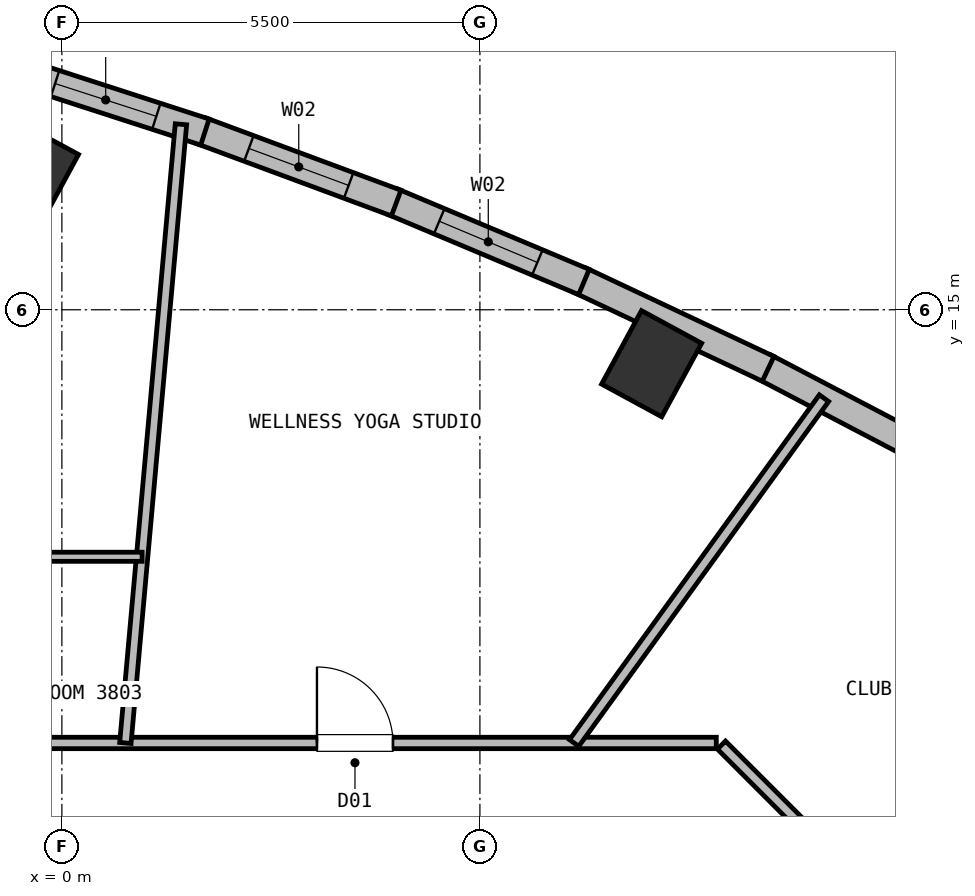
"""IFC4 building model, lengths in metres.
Left out: names, types, materials, properties, quantities, classifications, styles, units other than length and angle.
Written with IfcOpenShell. Run it as: python <this file> out.ifc"""

import sys

from ifc_helpers import new_model, si_unit, direction, frame, frame_2d, origin, origin_2d, place, context, subcontext, project, spatial, rectangle, extrude, element, fill, save


model = new_model("IFC4")
c1 = context("Model", 3, precision=1e-05, world=origin(), true_north=direction((0.0, 1.0)))
c2 = subcontext(c1, "Body", "Model", "MODEL_VIEW")
j1 = project(units=[si_unit("LENGTHUNIT", "METRE"), si_unit("PLANEANGLEUNIT", "RADIAN")], contexts=[c1])
p1 = place(None, origin())
s1 = spatial("IfcSite", under=j1, at=p1, CompositionType="ELEMENT")
p2 = place(p1, origin())
s2 = spatial("IfcBuilding", under=s1, at=p2, CompositionType="ELEMENT")
p3 = place(p2, frame((0.0, 0.0, 142.25)))
s3 = spatial("IfcBuildingStorey", under=s2, at=p3, CompositionType="ELEMENT", Elevation=142.25)
for number, where, z_axis, x_axis in (
    (1, (7.759, 14.29, 0.0), (0.0, 0.0, 1.0), (-0.879, 0.477, 0.0)),
    (2, (-0.439, 16.774, 0.0), (0.0, 0.0, 1.0), (-0.879, 0.477, 0.0)),
):
    element("IfcColumn", number, at=place(p3, frame(where, z_axis=z_axis, x_axis=x_axis)), inside=s3, PredefinedType="COLUMN", context=c2, shape_type="SweptSolid", body=[
        extrude(rectangle(XDim=0.9, YDim=1.1, at=origin_2d()), origin(), (0.0, 0.0, 1.0), 3.75),
    ])
p4 = place(p3, frame((9.248, 14.245, 0.0), z_axis=(0.0, 0.0, 1.0), x_axis=(0.885821049336, -0.464027012741, 0.0)))
e3 = element("IfcWall", 3, at=p4, inside=s3, PredefinedType="SOLIDWALL", context=c2, shape_type="SweptSolid", body=[
    extrude(rectangle(XDim=2.734, YDim=0.36, at=frame_2d((1.367, 0.0))), origin(), (0.0, 0.0, 1.0), 3.5),
])
p5 = place(p3, frame((6.823, 15.386, 0.0), z_axis=(0.0, 0.0, 1.0), x_axis=(0.904715296729, -0.426016703739, 0.0)))
e4 = element("IfcWall", 4, at=p5, inside=s3, PredefinedType="SOLIDWALL", context=c2, shape_type="SweptSolid", body=[
    extrude(rectangle(XDim=2.729, YDim=0.36, at=frame_2d((1.365, 0.0))), origin(), (0.0, 0.0, 1.0), 3.5),
])
p6 = place(p3, frame((4.352, 16.422, 0.0), z_axis=(0.0, 0.0, 1.0), x_axis=(0.921993601294, -0.387205112534, 0.0)))
e5 = element("IfcWall", 5, at=p6, inside=s3, PredefinedType="SOLIDWALL", context=c2, shape_type="SweptSolid", body=[
    extrude(rectangle(XDim=2.729, YDim=0.36, at=frame_2d((1.365, 0.0))), origin(), (0.0, 0.0, 1.0), 3.5),
])
p7 = place(p6, frame((0.665, 0.0, 0.72)))
e6 = element("IfcOpeningElement", 6, at=p7, cuts=e5, PredefinedType="OPENING", context=c2, shape_type="SweptSolid", body=[
    extrude(rectangle(XDim=1.4, YDim=1.84, at=frame_2d((0.7, 0.92))), frame((0.0, 0.19, 0.0), z_axis=(0.0, -1.0, 0.0), x_axis=(1.0, 0.0, 0.0)), (0.0, 0.0, 1.0), 0.38),
])
p8 = place(p3, frame((1.835, 17.355, 0.0), z_axis=(0.0, 0.0, 1.0), x_axis=(0.937570914704, -0.347794163121, 0.0)))
e7 = element("IfcWall", 7, at=p8, inside=s3, PredefinedType="SOLIDWALL", context=c2, shape_type="SweptSolid", body=[
    extrude(rectangle(XDim=2.734, YDim=0.36, at=frame_2d((1.367, 0.0))), origin(), (0.0, 0.0, 1.0), 3.5),
])
p9 = place(p8, frame((0.667, 0.0, 0.72)))
e8 = element("IfcOpeningElement", 8, at=p9, cuts=e7, PredefinedType="OPENING", context=c2, shape_type="SweptSolid", body=[
    extrude(rectangle(XDim=1.4, YDim=1.84, at=frame_2d((0.7, 0.92))), frame((0.0, 0.19, 0.0), z_axis=(0.0, -1.0, 0.0), x_axis=(1.0, 0.0, 0.0)), (0.0, 0.0, 1.0), 0.38),
])
p10 = place(p3, frame((-0.729, 18.184, 0.0), z_axis=(0.0, 0.0, 1.0), x_axis=(0.951405423372, -0.307941098877, 0.0)))
e9 = element("IfcWall", 9, at=p10, inside=s3, PredefinedType="SOLIDWALL", context=c2, shape_type="SweptSolid", body=[
    extrude(rectangle(XDim=2.744, YDim=0.36, at=frame_2d((1.372, 0.0))), origin(), (0.0, 0.0, 1.0), 3.5),
])
p11 = place(p10, frame((0.672, 0.0, 0.72)))
e10 = element("IfcOpeningElement", 10, at=p11, cuts=e9, PredefinedType="OPENING", context=c2, shape_type="SweptSolid", body=[
    extrude(rectangle(XDim=1.4, YDim=1.84, at=frame_2d((0.7, 0.92))), frame((0.0, 0.19, 0.0), z_axis=(0.0, -1.0, 0.0), x_axis=(1.0, 0.0, 0.0)), (0.0, 0.0, 1.0), 0.38),
])
p12 = place(p3, frame((8.678, 9.272, 0.0), z_axis=(0.0, 0.0, 1.0), x_axis=(0.707106781187, -0.707106781187, 0.0)))
e11 = element("IfcWall", 11, at=p12, inside=s3, PredefinedType="PARTITIONING", context=c2, shape_type="SweptSolid", body=[
    extrude(rectangle(XDim=2.89, YDim=0.15, at=frame_2d((1.445, 0.0))), origin(), (0.0, 0.0, 1.0), 3.5),
])
p13 = place(p3, frame((-8.61, 9.3, 0.0), z_axis=(0.0, 0.0, 1.0), x_axis=(1.0, 0.0, 0.0)))
e12 = element("IfcWall", 12, at=p13, inside=s3, PredefinedType="PARTITIONING", context=c2, shape_type="SweptSolid", body=[
    extrude(rectangle(XDim=17.22, YDim=0.15, at=frame_2d((8.61, 0.0))), origin(), (0.0, 0.0, 1.0), 3.5),
])
p14 = place(p13, frame((11.966, 0.0, 0.0)))
e13 = element("IfcOpeningElement", 13, at=p14, cuts=e12, PredefinedType="OPENING", context=c2, shape_type="SweptSolid", body=[
    extrude(rectangle(XDim=1.0, YDim=2.15, at=frame_2d((0.5, 1.075))), frame((0.0, 0.085, 0.0), z_axis=(0.0, -1.0, 0.0), x_axis=(1.0, 0.0, 0.0)), (0.0, 0.0, 1.0), 0.17),
])
p15 = place(p13, frame((1.059, 0.0, 0.0)))
e14 = element("IfcOpeningElement", 14, at=p15, cuts=e12, PredefinedType="OPENING", context=c2, shape_type="SweptSolid", body=[
    extrude(rectangle(XDim=1.0, YDim=2.15, at=frame_2d((0.5, 1.075))), frame((0.0, 0.085, 0.0), z_axis=(0.0, -1.0, 0.0), x_axis=(1.0, 0.0, 0.0)), (0.0, 0.0, 1.0), 0.17),
])
p16 = place(p13, frame((4.252, 0.0, 0.0)))
e15 = element("IfcOpeningElement", 15, at=p16, cuts=e12, PredefinedType="OPENING", context=c2, shape_type="SweptSolid", body=[
    extrude(rectangle(XDim=1.06, YDim=2.15, at=frame_2d((0.53, 1.075))), frame((0.0, 0.085, 0.0), z_axis=(0.0, -1.0, 0.0), x_axis=(1.0, 0.0, 0.0)), (0.0, 0.0, 1.0), 0.17),
])
p17 = place(p3, frame((6.739, 9.3, 0.0), z_axis=(0.0, 0.0, 1.0), x_axis=(0.586776904719, 0.809748642536, 0.0)))
e16 = element("IfcWall", 16, at=p17, inside=s3, PredefinedType="PARTITIONING", context=c2, shape_type="SweptSolid", body=[
    extrude(rectangle(XDim=5.603, YDim=0.15, at=frame_2d((2.801, 0.0))), origin(), (0.0, 0.0, 1.0), 3.5),
])
p18 = place(p3, frame((0.835, 9.3, 0.0), z_axis=(0.0, 0.0, 1.0), x_axis=(0.089461102412, 0.995990316798, 0.0)))
e17 = element("IfcWall", 17, at=p18, inside=s3, PredefinedType="PARTITIONING", context=c2, shape_type="SweptSolid", body=[
    extrude(rectangle(XDim=8.173, YDim=0.15, at=frame_2d((4.087, 0.0))), origin(), (0.0, 0.0, 1.0), 3.5),
])
p19 = place(p3, frame((-2.469, 11.75, 0.0), z_axis=(0.0, 0.0, 1.0), x_axis=(1.0, 0.0, 0.0)))
e18 = element("IfcWall", 18, at=p19, inside=s3, PredefinedType="PARTITIONING", context=c2, shape_type="SweptSolid", body=[
    extrude(rectangle(XDim=3.524, YDim=0.12, at=frame_2d((1.762, 0.0))), origin(), (0.0, 0.0, 1.0), 3.5),
])
p20 = place(p19, frame((1.302, 0.0, 0.0)))
e19 = element("IfcOpeningElement", 19, at=p20, cuts=e18, PredefinedType="OPENING", context=c2, shape_type="SweptSolid", body=[
    extrude(rectangle(XDim=0.92, YDim=2.1, at=frame_2d((0.46, 1.05))), frame((0.0, 0.07, 0.0), z_axis=(0.0, -1.0, 0.0), x_axis=(1.0, 0.0, 0.0)), (0.0, 0.0, 1.0), 0.14),
])
p21 = place(p7, origin())
e20 = element("IfcWindow", 20, at=p21, inside=s3, PartitioningType="SINGLE_PANEL", PredefinedType="WINDOW", context=c2, shape_type="SweptSolid", body=[
    extrude(rectangle(XDim=1.4, YDim=1.84, at=frame_2d((0.7, 0.92))), frame((0.0, 0.03, 0.0), z_axis=(0.0, -1.0, 0.0), x_axis=(1.0, 0.0, 0.0)), (0.0, 0.0, 1.0), 0.06),
])
fill(e6, e20)
p22 = place(p9, origin())
e21 = element("IfcWindow", 21, at=p22, inside=s3, PartitioningType="SINGLE_PANEL", PredefinedType="WINDOW", context=c2, shape_type="SweptSolid", body=[
    extrude(rectangle(XDim=1.4, YDim=1.84, at=frame_2d((0.7, 0.92))), frame((0.0, 0.03, 0.0), z_axis=(0.0, -1.0, 0.0), x_axis=(1.0, 0.0, 0.0)), (0.0, 0.0, 1.0), 0.06),
])
fill(e8, e21)
p23 = place(p11, origin())
e22 = element("IfcWindow", 22, at=p23, inside=s3, PartitioningType="SINGLE_PANEL", PredefinedType="WINDOW", context=c2, shape_type="SweptSolid", body=[
    extrude(rectangle(XDim=1.4, YDim=1.84, at=frame_2d((0.7, 0.92))), frame((0.0, 0.03, 0.0), z_axis=(0.0, -1.0, 0.0), x_axis=(1.0, 0.0, 0.0)), (0.0, 0.0, 1.0), 0.06),
])
fill(e10, e22)
p24 = place(p14, origin())
e23 = element("IfcDoor", 23, at=p24, inside=s3, OperationType="SINGLE_SWING_LEFT", PredefinedType="DOOR", context=c2, shape_type="SweptSolid", body=[
    extrude(rectangle(XDim=1.0, YDim=2.15, at=frame_2d((0.5, 1.075))), frame((0.0, 0.025, 0.0), z_axis=(0.0, -1.0, 0.0), x_axis=(1.0, 0.0, 0.0)), (0.0, 0.0, 1.0), 0.05),
])
fill(e13, e23)
save(model, sys.argv[1])
